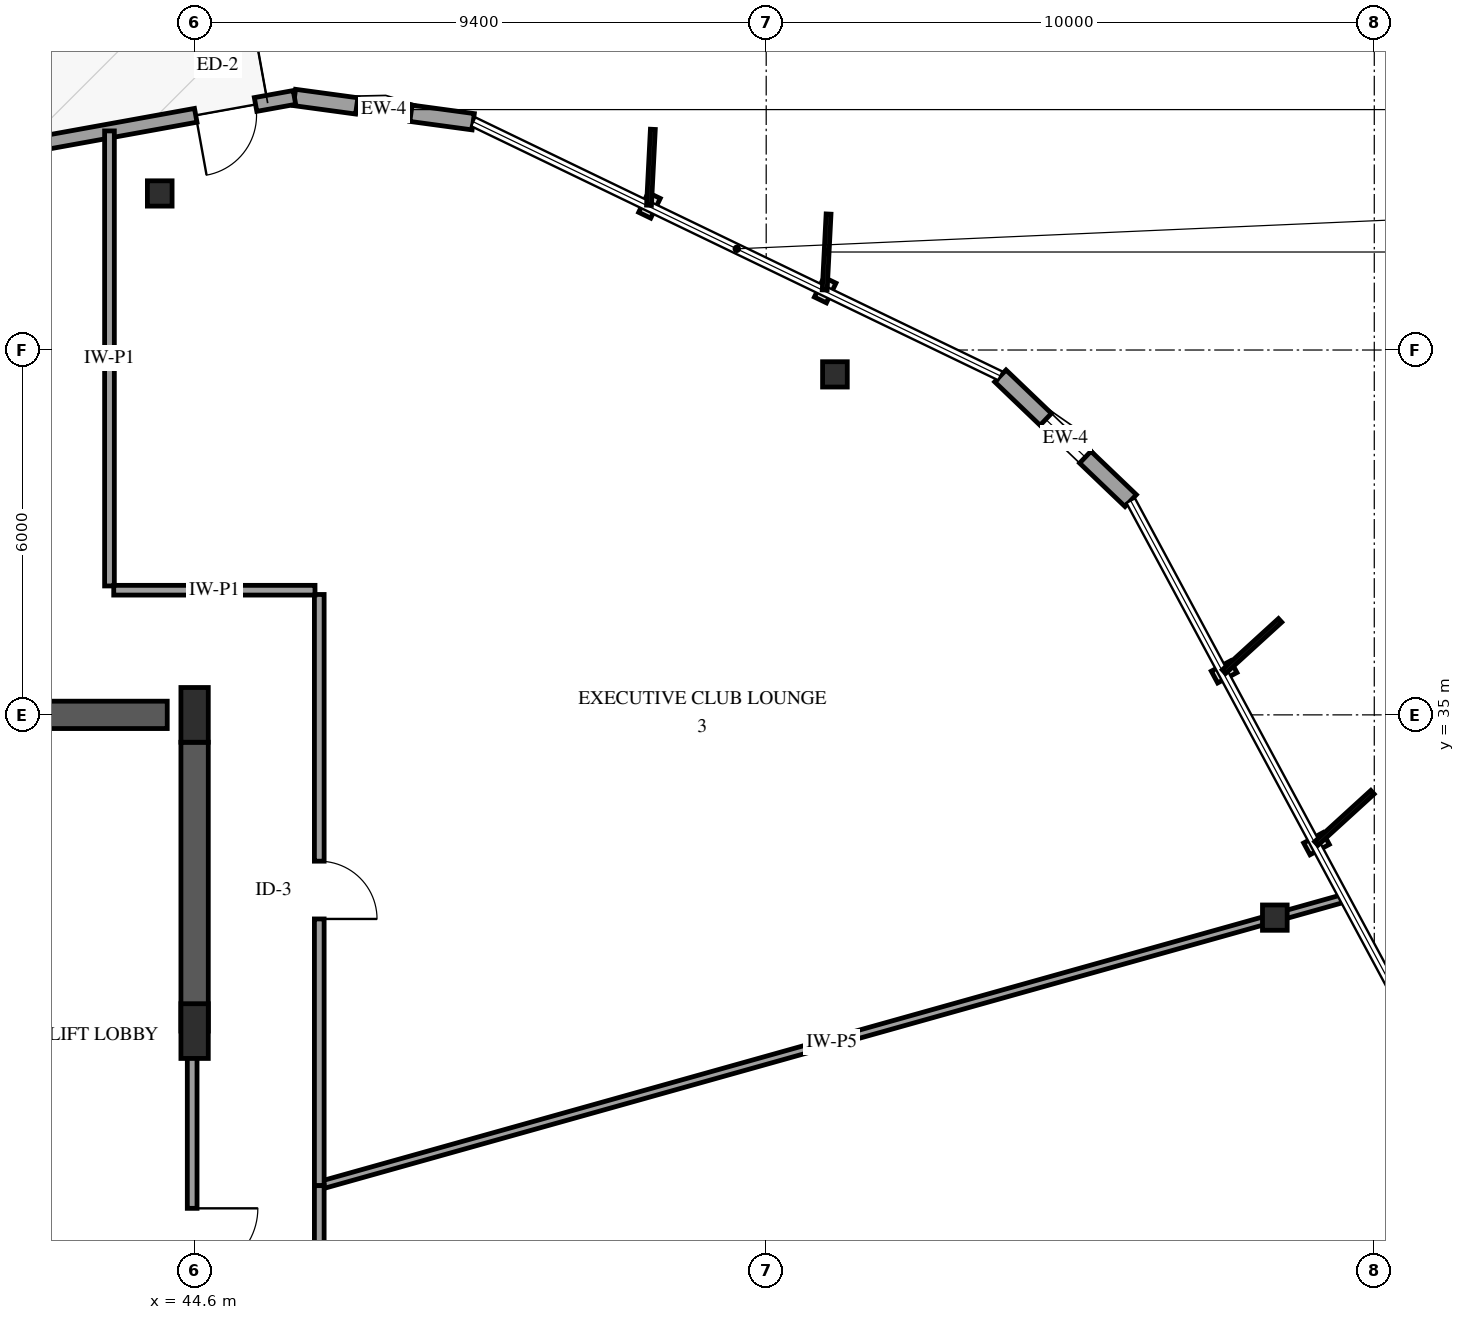
"""IFC4 building model, lengths in metres.
Left out: names, types, materials, properties, quantities, classifications, styles, units other than length and angle.
Written with IfcOpenShell. Run it as: python <this file> out.ifc"""

import sys

from ifc_helpers import new_model, si_unit, direction, frame, frame_2d, origin, origin_2d, place, context, subcontext, project, spatial, rectangle, i_section, extrude, element, fill, save


model = new_model("IFC4")
c1 = context("Model", 3, precision=1e-05, world=origin(), true_north=direction((0.0, 1.0)))
c2 = subcontext(c1, "Body", "Model", "MODEL_VIEW")
j1 = project(units=[si_unit("LENGTHUNIT", "METRE"), si_unit("PLANEANGLEUNIT", "RADIAN")], contexts=[c1])
p1 = place(None, origin())
s1 = spatial("IfcSite", under=j1, at=p1, CompositionType="ELEMENT")
p2 = place(p1, origin())
s2 = spatial("IfcBuilding", under=s1, at=p2, CompositionType="ELEMENT")
p3 = place(p2, frame((0.0, 0.0, 208.6)))
s3 = spatial("IfcBuildingStorey", under=s2, at=p3, CompositionType="ELEMENT", Elevation=208.6)
p4 = place(p3, frame((41.3, 35.0, 0.0), z_axis=(0.0, 0.0, 1.0), x_axis=(1.0, 0.0, 0.0)))
e1 = element("IfcWall", 1, at=p4, inside=s3, PredefinedType="SHEAR", context=c2, shape_type="SweptSolid", body=[
    extrude(rectangle(XDim=2.85, YDim=0.45, at=frame_2d((1.425, 0.0))), origin(), (0.0, 0.0, 1.0), 3.6),
])
p5 = place(p3, frame((44.6, 29.8, 0.0), z_axis=(0.0, 0.0, 1.0), x_axis=(0.0, 1.0, 0.0)))
e2 = element("IfcWall", 2, at=p5, inside=s3, PredefinedType="SHEAR", context=c2, shape_type="SweptSolid", body=[
    extrude(rectangle(XDim=4.75, YDim=0.45, at=frame_2d((2.375, 0.0))), origin(), (0.0, 0.0, 1.0), 3.6),
])
for number, where, z_axis, x_axis in (
    (3, (44.6, 29.8, 0.0), (0.0, 0.0, 1.0), (1.0, 0.0, 0.0)),
    (4, (44.6, 35.0, 0.0), (0.0, 0.0, 1.0), (1.0, 0.0, 0.0)),
):
    element("IfcColumn", number, at=place(p3, frame(where, z_axis=z_axis, x_axis=x_axis)), inside=s3, PredefinedType="PILASTER", context=c2, shape_type="SweptSolid", body=[
        extrude(rectangle(XDim=0.45, YDim=0.9, at=origin_2d()), origin(), (0.0, 0.0, 1.0), 3.6),
    ])
for number, where, z_axis, x_axis in (
    (5, (62.365, 31.666, 0.0), (0.0, 0.0, 1.0), (1.0, 0.0, 0.0)),
    (6, (55.13, 40.599, 0.0), (0.0, 0.0, 1.0), (1.0, 0.0, 0.0)),
    (7, (44.027, 43.574, 0.0), (0.0, 0.0, 1.0), (1.0, 0.0, 0.0)),
):
    element("IfcColumn", number, at=place(p3, frame(where, z_axis=z_axis, x_axis=x_axis)), inside=s3, PredefinedType="COLUMN", context=c2, shape_type="SweptSolid", body=[
        extrude(i_section(OverallWidth=0.406, OverallDepth=0.416, WebThickness=0.03, FlangeThickness=0.048, FilletRadius=0.038, at=origin_2d()), origin(), (0.0, 0.0, 1.0), 3.6),
    ])
p6 = place(p3, frame((49.182, 44.754, 0.0), z_axis=(0.0, 0.0, 1.0), x_axis=(-0.990884670692, 0.134712914702, 0.0)))
e8 = element("IfcWall", 8, at=p6, inside=s3, PredefinedType="SOLIDWALL", context=c2, shape_type="SweptSolid", body=[
    extrude(rectangle(XDim=2.967, YDim=0.27, at=frame_2d((1.483, 0.0))), origin(), (0.0, 0.0, 1.0), 2.679),
])
p7 = place(p6, frame((1.033, 0.0, 0.75)))
e9 = element("IfcOpeningElement", 9, at=p7, cuts=e8, PredefinedType="OPENING", context=c2, shape_type="SweptSolid", body=[
    extrude(rectangle(XDim=0.9, YDim=1.5, at=frame_2d((0.45, 0.75))), frame((0.0, 0.145, 0.0), z_axis=(0.0, -1.0, 0.0), x_axis=(1.0, 0.0, 0.0)), (0.0, 0.0, 1.0), 0.29),
])
p8 = place(p3, frame((46.242, 45.154, 0.0), z_axis=(0.0, 0.0, 1.0), x_axis=(-0.984006003463, -0.178135300119, 0.0)))
e10 = element("IfcWall", 10, at=p8, inside=s3, PredefinedType="SOLIDWALL", context=c2, shape_type="SweptSolid", body=[
    extrude(rectangle(XDim=9.624, YDim=0.23, at=frame_2d((4.812, 0.0))), origin(), (0.0, 0.0, 1.0), 2.679),
])
p9 = place(p8, frame((0.65, 0.0, 0.0)))
e11 = element("IfcOpeningElement", 11, at=p9, cuts=e10, PredefinedType="OPENING", context=c2, shape_type="SweptSolid", body=[
    extrude(rectangle(XDim=1.0, YDim=2.15, at=frame_2d((0.5, 1.075))), frame((0.0, 0.125, 0.0), z_axis=(0.0, -1.0, 0.0), x_axis=(1.0, 0.0, 0.0)), (0.0, 0.0, 1.0), 0.25),
])
p10 = place(p8, frame((5.524, 0.0, 0.72)))
e12 = element("IfcOpeningElement", 12, at=p10, cuts=e10, PredefinedType="OPENING", context=c2, shape_type="SweptSolid", body=[
    extrude(rectangle(XDim=1.35, YDim=1.65, at=frame_2d((0.675, 0.825))), frame((0.0, 0.125, 0.0), z_axis=(0.0, -1.0, 0.0), x_axis=(1.0, 0.0, 0.0)), (0.0, 0.0, 1.0), 0.25),
])
p11 = place(p3, frame((63.783, 17.591, 0.0), z_axis=(0.0, 0.0, 1.0), x_axis=(0.134677360418, 0.990889503724, 0.0)))
e13 = element("IfcWall", 13, at=p11, inside=s3, PredefinedType="SOLIDWALL", context=c2, shape_type="SweptSolid", body=[
    extrude(rectangle(XDim=9.624, YDim=0.23, at=frame_2d((4.812, 0.0))), origin(), (0.0, 0.0, 1.0), 2.679),
])
p12 = place(p11, frame((4.312, 0.0, 0.0)))
e14 = element("IfcOpeningElement", 14, at=p12, cuts=e13, PredefinedType="OPENING", context=c2, shape_type="SweptSolid", body=[
    extrude(rectangle(XDim=1.0, YDim=2.15, at=frame_2d((0.5, 1.075))), frame((0.0, 0.125, 0.0), z_axis=(0.0, -1.0, 0.0), x_axis=(1.0, 0.0, 0.0)), (0.0, 0.0, 1.0), 0.25),
])
p13 = place(p11, frame((0.44, 0.0, 0.72)))
e15 = element("IfcOpeningElement", 15, at=p13, cuts=e13, PredefinedType="OPENING", context=c2, shape_type="SweptSolid", body=[
    extrude(rectangle(XDim=1.35, YDim=1.65, at=frame_2d((0.675, 0.825))), frame((0.0, 0.125, 0.0), z_axis=(0.0, -1.0, 0.0), x_axis=(1.0, 0.0, 0.0)), (0.0, 0.0, 1.0), 0.25),
])
p14 = place(p11, frame((5.952, 0.0, 0.72)))
e16 = element("IfcOpeningElement", 16, at=p14, cuts=e13, PredefinedType="OPENING", context=c2, shape_type="SweptSolid", body=[
    extrude(rectangle(XDim=1.35, YDim=1.65, at=frame_2d((0.675, 0.825))), frame((0.0, 0.125, 0.0), z_axis=(0.0, -1.0, 0.0), x_axis=(1.0, 0.0, 0.0)), (0.0, 0.0, 1.0), 0.25),
])
p15 = place(p3, frame((59.994, 38.523, 0.0), z_axis=(0.0, 0.0, 1.0), x_axis=(-0.722489918311, 0.691381456172, 0.0)))
e17 = element("IfcWall", 17, at=p15, inside=s3, PredefinedType="SOLIDWALL", context=c2, shape_type="SweptSolid", body=[
    extrude(rectangle(XDim=2.967, YDim=0.27, at=frame_2d((1.483, 0.0))), origin(), (0.0, 0.0, 1.0), 2.679),
])
p16 = place(p15, frame((1.033, 0.0, 0.75)))
e18 = element("IfcOpeningElement", 18, at=p16, cuts=e17, PredefinedType="OPENING", context=c2, shape_type="SweptSolid", body=[
    extrude(rectangle(XDim=0.9, YDim=1.5, at=frame_2d((0.45, 0.75))), frame((0.0, 0.145, 0.0), z_axis=(0.0, -1.0, 0.0), x_axis=(1.0, 0.0, 0.0)), (0.0, 0.0, 1.0), 0.29),
])
p17 = place(p3, frame((63.508, 31.986, 0.0), z_axis=(0.0, 0.0, 1.0), x_axis=(-0.962849090676, -0.270040049964, 0.0)))
e19 = element("IfcWall", 19, at=p17, inside=s3, PredefinedType="PARTITIONING", context=c2, shape_type="SweptSolid", body=[
    extrude(rectangle(XDim=17.509, YDim=0.13, at=frame_2d((8.754, 0.0))), origin(), (0.0, 0.0, 1.0), 3.3),
])
p18 = place(p3, frame((46.65, 36.98, 0.0), z_axis=(0.0, 0.0, 1.0), x_axis=(0.0, -1.0, 0.0)))
e20 = element("IfcWall", 20, at=p18, inside=s3, PredefinedType="PARTITIONING", context=c2, shape_type="SweptSolid", body=[
    extrude(rectangle(XDim=9.722, YDim=0.16, at=frame_2d((4.861, 0.0))), origin(), (0.0, 0.0, 1.0), 3.3),
])
p19 = place(p18, frame((4.386, 0.0, 0.0)))
e21 = element("IfcOpeningElement", 21, at=p19, cuts=e20, PredefinedType="OPENING", context=c2, shape_type="SweptSolid", body=[
    extrude(rectangle(XDim=0.95, YDim=2.15, at=frame_2d((0.475, 1.075))), frame((0.0, 0.09, 0.0), z_axis=(0.0, -1.0, 0.0), x_axis=(1.0, 0.0, 0.0)), (0.0, 0.0, 1.0), 0.18),
])
p20 = place(p3, frame((46.65, 27.258, 0.0), z_axis=(0.0, 0.0, 1.0), x_axis=(0.0, -1.0, 0.0)))
e22 = element("IfcWall", 22, at=p20, inside=s3, PredefinedType="PARTITIONING", context=c2, shape_type="SweptSolid", body=[
    extrude(rectangle(XDim=8.685, YDim=0.16, at=frame_2d((4.343, 0.0))), origin(), (0.0, 0.0, 1.0), 3.3),
])
p21 = place(p20, frame((3.867, 0.0, 0.0)))
e23 = element("IfcOpeningElement", 23, at=p21, cuts=e22, PredefinedType="OPENING", context=c2, shape_type="SweptSolid", body=[
    extrude(rectangle(XDim=0.95, YDim=2.15, at=frame_2d((0.475, 1.075))), frame((0.0, 0.09, 0.0), z_axis=(0.0, -1.0, 0.0), x_axis=(1.0, 0.0, 0.0)), (0.0, 0.0, 1.0), 0.18),
])
p22 = place(p3, frame((43.2, 44.603, 0.0), z_axis=(0.0, 0.0, 1.0), x_axis=(0.0, -1.0, 0.0)))
e24 = element("IfcWall", 24, at=p22, inside=s3, PredefinedType="PARTITIONING", context=c2, shape_type="SweptSolid", body=[
    extrude(rectangle(XDim=7.483, YDim=0.16, at=frame_2d((3.741, 0.0))), origin(), (0.0, 0.0, 1.0), 2.595),
])
p23 = place(p3, frame((44.56, 29.8, 0.0), z_axis=(0.0, 0.0, 1.0), x_axis=(0.0, -1.0, 0.0)))
e25 = element("IfcWall", 25, at=p23, inside=s3, PredefinedType="PARTITIONING", context=c2, shape_type="SweptSolid", body=[
    extrude(rectangle(XDim=6.91, YDim=0.16, at=frame_2d((3.455, 0.0))), origin(), (0.0, 0.0, 1.0), 2.34),
])
p24 = place(p23, frame((2.915, 0.0, 0.0)))
e26 = element("IfcOpeningElement", 26, at=p24, cuts=e25, PredefinedType="OPENING", context=c2, shape_type="SweptSolid", body=[
    extrude(rectangle(XDim=1.08, YDim=2.15, at=frame_2d((0.54, 1.075))), frame((0.0, 0.09, 0.0), z_axis=(0.0, -1.0, 0.0), x_axis=(1.0, 0.0, 0.0)), (0.0, 0.0, 1.0), 0.18),
])
p25 = place(p3, frame((43.27, 37.05, 0.0), z_axis=(0.0, 0.0, 1.0), x_axis=(1.0, 0.0, 0.0)))
e27 = element("IfcWall", 27, at=p25, inside=s3, PredefinedType="PARTITIONING", context=c2, shape_type="SweptSolid", body=[
    extrude(rectangle(XDim=3.31, YDim=0.16, at=frame_2d((1.655, 0.0))), origin(), (0.0, 0.0, 1.0), 3.3),
])
p26 = place(p7, origin())
e28 = element("IfcWindow", 28, at=p26, inside=s3, PartitioningType="SINGLE_PANEL", PredefinedType="WINDOW", context=c2, shape_type="SweptSolid", body=[
    extrude(rectangle(XDim=0.9, YDim=1.5, at=frame_2d((0.45, 0.75))), frame((0.0, 0.03, 0.0), z_axis=(0.0, -1.0, 0.0), x_axis=(1.0, 0.0, 0.0)), (0.0, 0.0, 1.0), 0.06),
])
fill(e9, e28)
p27 = place(p9, origin())
e29 = element("IfcDoor", 29, at=p27, inside=s3, OperationType="SINGLE_SWING_RIGHT", PredefinedType="DOOR", context=c2, shape_type="SweptSolid", body=[
    extrude(rectangle(XDim=1.0, YDim=2.15, at=frame_2d((0.5, 1.075))), frame((0.0, 0.025, 0.0), z_axis=(0.0, -1.0, 0.0), x_axis=(1.0, 0.0, 0.0)), (0.0, 0.0, 1.0), 0.05),
])
fill(e11, e29)
p28 = place(p16, origin())
e30 = element("IfcWindow", 30, at=p28, inside=s3, PartitioningType="SINGLE_PANEL", PredefinedType="WINDOW", context=c2, shape_type="SweptSolid", body=[
    extrude(rectangle(XDim=0.9, YDim=1.5, at=frame_2d((0.45, 0.75))), frame((0.0, 0.03, 0.0), z_axis=(0.0, -1.0, 0.0), x_axis=(1.0, 0.0, 0.0)), (0.0, 0.0, 1.0), 0.06),
])
fill(e18, e30)
p29 = place(p19, origin())
e31 = element("IfcDoor", 31, at=p29, inside=s3, OperationType="SINGLE_SWING_RIGHT", PredefinedType="DOOR", context=c2, shape_type="SweptSolid", body=[
    extrude(rectangle(XDim=0.95, YDim=2.15, at=frame_2d((0.475, 1.075))), frame((0.0, 0.025, 0.0), z_axis=(0.0, -1.0, 0.0), x_axis=(1.0, 0.0, 0.0)), (0.0, 0.0, 1.0), 0.05),
])
fill(e21, e31)
p30 = place(p24, origin())
e32 = element("IfcDoor", 32, at=p30, inside=s3, OperationType="SINGLE_SWING_LEFT", PredefinedType="DOOR", context=c2, shape_type="SweptSolid", body=[
    extrude(rectangle(XDim=1.08, YDim=2.15, at=frame_2d((0.54, 1.075))), frame((0.0, 0.025, 0.0), z_axis=(0.0, -1.0, 0.0), x_axis=(1.0, 0.0, 0.0)), (0.0, 0.0, 1.0), 0.05),
])
fill(e26, e32)
save(model, sys.argv[1])
